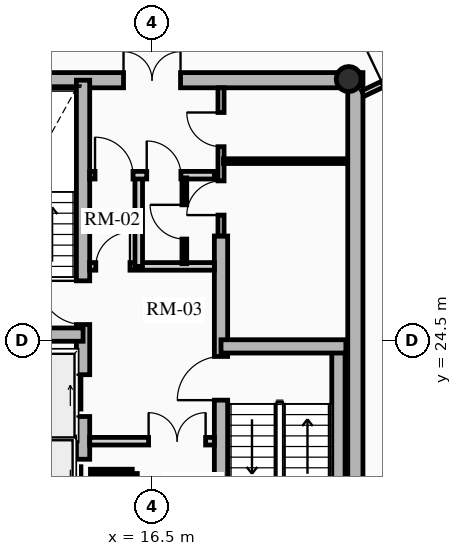
"""IFC4 building model, lengths in metres.
Left out: names, types, materials, properties, quantities, classifications, styles, units other than length and angle.
Written with IfcOpenShell. Run it as: python <this file> out.ifc"""

import sys

from ifc_helpers import new_model, si_unit, direction, frame, frame_2d, origin, origin_2d, place, context, subcontext, project, spatial, rectangle, hollow_circle, extrude, source, transform, mapped, element, fill, save


model = new_model("IFC4")
c1 = context("Model", 3, precision=1e-05, world=origin(), true_north=direction((0.0, 1.0)))
c2 = subcontext(c1, "Body", "Model", "MODEL_VIEW")
j1 = project(units=[si_unit("LENGTHUNIT", "METRE"), si_unit("PLANEANGLEUNIT", "RADIAN")], contexts=[c1])
p1 = place(None, origin())
s1 = spatial("IfcSite", under=j1, at=p1, CompositionType="ELEMENT")
p2 = place(p1, origin())
s2 = spatial("IfcBuilding", under=s1, at=p2, CompositionType="ELEMENT")
p3 = place(p2, frame((0.0, 0.0, 222.85)))
s3 = spatial("IfcBuildingStorey", under=s2, at=p3, CompositionType="ELEMENT", Elevation=222.85)
p4 = place(p3, frame((21.85, 17.45, 0.0), z_axis=(0.0, 0.0, 1.0), x_axis=(0.0, 1.0, 0.0)))
e1 = element("IfcWall", 1, at=p4, inside=s3, PredefinedType="SHEAR", context=c2, shape_type="SweptSolid", body=[
    extrude(rectangle(XDim=14.1, YDim=0.4, at=frame_2d((7.05, 0.0))), origin(), (0.0, 0.0, 1.0), 3.2),
])
p5 = place(p3, frame((11.15, 31.35, 0.0), z_axis=(0.0, 0.0, 1.0), x_axis=(1.0, 0.0, 0.0)))
e2 = element("IfcWall", 2, at=p5, inside=s3, PredefinedType="SHEAR", context=c2, shape_type="SweptSolid", body=[
    extrude(rectangle(XDim=10.7, YDim=0.4, at=frame_2d((5.35, 0.0))), origin(), (0.0, 0.0, 1.0), 3.2),
])
m1 = source(origin(), c2, "Body", "SweptSolid", [
    extrude(rectangle(XDim=1.5, YDim=2.02, at=frame_2d((0.75, 1.01))), frame((0.0, 0.21, 0.0), z_axis=(0.0, -1.0, 0.0), x_axis=(1.0, 0.0, 0.0)), (0.0, 0.0, 1.0), 0.42),
])
p6 = place(p5, frame((4.6, 0.0, 0.0)))
e3 = element("IfcOpeningElement", 3, at=p6, cuts=e2, PredefinedType="OPENING", context=c2, shape_type="MappedRepresentation", body=[
    mapped(m1, transform((0.0, 0.0, 0.0), x_axis=(1.0, 0.0, 0.0), y_axis=(0.0, 1.0, 0.0), z_axis=(0.0, 0.0, 1.0), scale=1.0)),
])
p7 = place(p3, frame((14.685, 17.65, 0.0), z_axis=(0.0, 0.0, 1.0), x_axis=(0.0, 1.0, 0.0)))
e4 = element("IfcWall", 4, at=p7, inside=s3, PredefinedType="SHEAR", context=c2, shape_type="SweptSolid", body=[
    extrude(rectangle(XDim=13.7, YDim=0.35, at=frame_2d((6.85, 0.0))), origin(), (0.0, 0.0, 1.0), 3.2),
])
m2 = source(origin(), c2, "Body", "SweptSolid", [
    extrude(rectangle(XDim=1.1, YDim=2.015, at=frame_2d((0.55, 1.007))), frame((0.0, 0.185, 0.0), z_axis=(0.0, -1.0, 0.0), x_axis=(1.0, 0.0, 0.0)), (0.0, 0.0, 1.0), 0.37),
])
p8 = place(p7, frame((4.85, 0.0, 0.0)))
e5 = element("IfcOpeningElement", 5, at=p8, cuts=e4, PredefinedType="OPENING", context=c2, shape_type="MappedRepresentation", body=[
    mapped(m2, transform((0.0, 0.0, 0.0), x_axis=(1.0, 0.0, 0.0), y_axis=(0.0, 1.0, 0.0), z_axis=(0.0, 0.0, 1.0), scale=1.0)),
])
p9 = place(p7, frame((0.625, 0.0, 0.0)))
e6 = element("IfcOpeningElement", 6, at=p9, cuts=e4, PredefinedType="OPENING", context=c2, shape_type="MappedRepresentation", body=[
    mapped(m2, transform((0.0, 0.0, 0.0), x_axis=(1.0, 0.0, 0.0), y_axis=(0.0, 1.0, 0.0), z_axis=(0.0, 0.0, 1.0), scale=1.0)),
])
p10 = place(p7, frame((2.625, 0.0, 0.0)))
e7 = element("IfcOpeningElement", 7, at=p10, cuts=e4, PredefinedType="OPENING", context=c2, shape_type="MappedRepresentation", body=[
    mapped(m2, transform((0.0, 0.0, 0.0), x_axis=(1.0, 0.0, 0.0), y_axis=(0.0, 1.0, 0.0), z_axis=(0.0, 0.0, 1.0), scale=1.0)),
])
m3 = source(origin(), c2, "Body", "SweptSolid", [
    extrude(rectangle(XDim=1.15, YDim=2.02, at=frame_2d((0.575, 1.01))), frame((0.0, 0.185, 0.0), z_axis=(0.0, -1.0, 0.0), x_axis=(1.0, 0.0, 0.0)), (0.0, 0.0, 1.0), 0.37),
])
p11 = place(p7, frame((7.27, 0.0, 0.0)))
e8 = element("IfcOpeningElement", 8, at=p11, cuts=e4, PredefinedType="OPENING", context=c2, shape_type="MappedRepresentation", body=[
    mapped(m3, transform((0.0, 0.0, 0.0), x_axis=(1.0, 0.0, 0.0), y_axis=(0.0, 1.0, 0.0), z_axis=(0.0, 0.0, 1.0), scale=1.0)),
])
p12 = place(p3, frame((18.315, 17.65, 0.0), z_axis=(0.0, 0.0, 1.0), x_axis=(0.0, 1.0, 0.0)))
e9 = element("IfcWall", 9, at=p12, inside=s3, PredefinedType="SHEAR", context=c2, shape_type="SweptSolid", body=[
    extrude(rectangle(XDim=9.6, YDim=0.35, at=frame_2d((4.8, 0.0))), origin(), (0.0, 0.0, 1.0), 3.2),
])
p13 = place(p12, frame((5.28, 0.0, 0.0)))
e10 = element("IfcOpeningElement", 10, at=p13, cuts=e9, PredefinedType="OPENING", context=c2, shape_type="MappedRepresentation", body=[
    mapped(m3, transform((0.0, 0.0, 0.0), x_axis=(1.0, 0.0, 0.0), y_axis=(0.0, 1.0, 0.0), z_axis=(0.0, 0.0, 1.0), scale=1.0)),
])
p14 = place(p3, frame((11.4, 24.655, 0.0), z_axis=(0.0, 0.0, 1.0), x_axis=(1.0, 0.0, 0.0)))
e11 = element("IfcWall", 11, at=p14, inside=s3, PredefinedType="SHEAR", context=c2, shape_type="SweptSolid", body=[
    extrude(rectangle(XDim=3.285, YDim=0.35, at=frame_2d((1.643, 0.0))), origin(), (0.0, 0.0, 1.0), 3.2),
])
p15 = place(p3, frame((21.405, 17.65, 0.0), z_axis=(0.0, 0.0, 1.0), x_axis=(0.0, 1.0, 0.0)))
e12 = element("IfcWall", 12, at=p15, inside=s3, PredefinedType="SHEAR", context=c2, shape_type="SweptSolid", body=[
    extrude(rectangle(XDim=6.695, YDim=0.35, at=frame_2d((3.348, 0.0))), origin(), (0.0, 0.0, 1.0), 3.2),
])
p16 = place(p3, frame((18.315, 24.345, 0.0), z_axis=(0.0, 0.0, 1.0), x_axis=(1.0, 0.0, 0.0)))
e13 = element("IfcWall", 13, at=p16, inside=s3, PredefinedType="SHEAR", context=c2, shape_type="SweptSolid", body=[
    extrude(rectangle(XDim=3.285, YDim=0.35, at=frame_2d((1.643, 0.0))), origin(), (0.0, 0.0, 1.0), 3.2),
])
p17 = place(p3, frame((21.675, 31.38, 0.0), z_axis=(0.0, 0.0, 1.0), x_axis=(1.0, 0.0, 0.0)))
e14 = element("IfcColumn", 14, at=p17, inside=s3, PredefinedType="COLUMN", context=c2, shape_type="SweptSolid", body=[
    extrude(hollow_circle(Radius=0.33, WallThickness=0.025, at=origin_2d()), origin(), (0.0, 0.0, 1.0), 3.2),
])
p18 = place(p3, frame((11.52, 21.8, 0.0), z_axis=(0.0, 0.0, 1.0), x_axis=(1.0, 0.0, 0.0)))
e15 = element("IfcWall", 15, at=p18, inside=s3, PredefinedType="SHEAR", context=c2, shape_type="SweptSolid", body=[
    extrude(rectangle(XDim=2.97, YDim=0.2, at=frame_2d((1.485, 0.0))), origin(), (0.0, 0.0, 1.0), 3.2),
])
p19 = place(p3, frame((14.86, 21.85, 0.0), z_axis=(0.0, 0.0, 1.0), x_axis=(1.0, 0.0, 0.0)))
e16 = element("IfcWall", 16, at=p19, inside=s3, PredefinedType="PARTITIONING", context=c2, shape_type="SweptSolid", body=[
    extrude(rectangle(XDim=3.28, YDim=0.2, at=frame_2d((1.64, 0.0))), origin(), (0.0, 0.0, 1.0), 2.975),
])
m4 = source(origin(), c2, "Body", "SweptSolid", [
    extrude(rectangle(XDim=1.5, YDim=2.02, at=frame_2d((0.75, 1.01))), frame((0.0, 0.11, 0.0), z_axis=(0.0, -1.0, 0.0), x_axis=(1.0, 0.0, 0.0)), (0.0, 0.0, 1.0), 0.22),
])
p20 = place(p19, frame((1.55, 0.0, 0.0)))
e17 = element("IfcOpeningElement", 17, at=p20, cuts=e16, PredefinedType="OPENING", context=c2, shape_type="MappedRepresentation", body=[
    mapped(m4, transform((0.0, 0.0, 0.0), x_axis=(1.0, 0.0, 0.0), y_axis=(0.0, 1.0, 0.0), z_axis=(0.0, 0.0, 1.0), scale=1.0)),
])
p21 = place(p3, frame((14.86, 26.45, 0.0), z_axis=(0.0, 0.0, 1.0), x_axis=(1.0, 0.0, 0.0)))
e18 = element("IfcWall", 18, at=p21, inside=s3, PredefinedType="PARTITIONING", context=c2, shape_type="SweptSolid", body=[
    extrude(rectangle(XDim=3.28, YDim=0.2, at=frame_2d((1.64, 0.0))), origin(), (0.0, 0.0, 1.0), 2.975),
])
m5 = source(origin(), c2, "Body", "SweptSolid", [
    extrude(rectangle(XDim=0.9, YDim=2.005, at=frame_2d((0.45, 1.002))), frame((0.0, 0.11, 0.0), z_axis=(0.0, -1.0, 0.0), x_axis=(1.0, 0.0, 0.0)), (0.0, 0.0, 1.0), 0.22),
])
p22 = place(p21, frame((0.16, 0.0, 0.0)))
e19 = element("IfcOpeningElement", 19, at=p22, cuts=e18, PredefinedType="OPENING", context=c2, shape_type="MappedRepresentation", body=[
    mapped(m5, transform((0.0, 0.0, 0.0), x_axis=(1.0, 0.0, 0.0), y_axis=(0.0, 1.0, 0.0), z_axis=(0.0, 0.0, 1.0), scale=1.0)),
])
p23 = place(p3, frame((16.15, 26.45, 0.0), z_axis=(0.0, 0.0, 1.0), x_axis=(0.0, 1.0, 0.0)))
e20 = element("IfcWall", 20, at=p23, inside=s3, PredefinedType="PARTITIONING", context=c2, shape_type="SweptSolid", body=[
    extrude(rectangle(XDim=2.4, YDim=0.2, at=frame_2d((1.2, 0.0))), origin(), (0.0, 0.0, 1.0), 2.975),
])
p24 = place(p3, frame((14.86, 28.85, 0.0), z_axis=(0.0, 0.0, 1.0), x_axis=(1.0, 0.0, 0.0)))
e21 = element("IfcWall", 21, at=p24, inside=s3, PredefinedType="PARTITIONING", context=c2, shape_type="SweptSolid", body=[
    extrude(rectangle(XDim=3.28, YDim=0.2, at=frame_2d((1.64, 0.0))), origin(), (0.0, 0.0, 1.0), 2.975),
])
m6 = source(origin(), c2, "Body", "SweptSolid", [
    extrude(rectangle(XDim=1.0, YDim=2.015, at=frame_2d((0.5, 1.007))), frame((0.0, 0.11, 0.0), z_axis=(0.0, -1.0, 0.0), x_axis=(1.0, 0.0, 0.0)), (0.0, 0.0, 1.0), 0.22),
])
p25 = place(p24, frame((0.14, 0.0, 0.0)))
e22 = element("IfcOpeningElement", 22, at=p25, cuts=e21, PredefinedType="OPENING", context=c2, shape_type="MappedRepresentation", body=[
    mapped(m6, transform((0.0, 0.0, 0.0), x_axis=(1.0, 0.0, 0.0), y_axis=(0.0, 1.0, 0.0), z_axis=(0.0, 0.0, 1.0), scale=1.0)),
])
p26 = place(p24, frame((1.5, 0.0, 0.0)))
e23 = element("IfcOpeningElement", 23, at=p26, cuts=e21, PredefinedType="OPENING", context=c2, shape_type="MappedRepresentation", body=[
    mapped(m5, transform((0.0, 0.0, 0.0), x_axis=(1.0, 0.0, 0.0), y_axis=(0.0, 1.0, 0.0), z_axis=(0.0, 0.0, 1.0), scale=1.0)),
])
p27 = place(p3, frame((16.05, 17.92, 0.0), z_axis=(0.0, 0.0, 1.0), x_axis=(0.0, 1.0, 0.0)))
e24 = element("IfcWall", 24, at=p27, inside=s3, PredefinedType="PARTITIONING", context=c2, shape_type="SweptSolid", body=[
    extrude(rectangle(XDim=3.08, YDim=0.125, at=frame_2d((1.54, 0.0))), origin(), (0.0, 0.0, 1.0), 2.975),
])
m7 = source(origin(), c2, "Body", "SweptSolid", [
    extrude(rectangle(XDim=0.9, YDim=2.005, at=frame_2d((0.45, 1.002))), frame((0.0, 0.073, 0.0), z_axis=(0.0, -1.0, 0.0), x_axis=(1.0, 0.0, 0.0)), (0.0, 0.0, 1.0), 0.145),
])
p28 = place(p27, frame((1.05, 0.0, 0.0)))
e25 = element("IfcOpeningElement", 25, at=p28, cuts=e24, PredefinedType="OPENING", context=c2, shape_type="MappedRepresentation", body=[
    mapped(m7, transform((0.0, 0.0, 0.0), x_axis=(1.0, 0.0, 0.0), y_axis=(0.0, 1.0, 0.0), z_axis=(0.0, 0.0, 1.0), scale=1.0)),
])
p29 = place(p3, frame((14.88, 21.05, 0.0), z_axis=(0.0, 0.0, 1.0), x_axis=(1.0, 0.0, 0.0)))
e26 = element("IfcWall", 26, at=p29, inside=s3, PredefinedType="PARTITIONING", context=c2, shape_type="SweptSolid", body=[
    extrude(rectangle(XDim=1.1, YDim=0.125, at=frame_2d((0.55, 0.0))), origin(), (0.0, 0.0, 1.0), 2.975),
])
p30 = place(p3, frame((17.35, 26.52, 0.0), z_axis=(0.0, 0.0, 1.0), x_axis=(0.0, 1.0, 0.0)))
e27 = element("IfcWall", 27, at=p30, inside=s3, PredefinedType="PARTITIONING", context=c2, shape_type="SweptSolid", body=[
    extrude(rectangle(XDim=2.26, YDim=0.125, at=frame_2d((1.13, 0.0))), origin(), (0.0, 0.0, 1.0), 2.975),
])
p31 = place(p30, frame((0.65, 0.0, 0.0)))
e28 = element("IfcOpeningElement", 28, at=p31, cuts=e27, PredefinedType="OPENING", context=c2, shape_type="MappedRepresentation", body=[
    mapped(m7, transform((0.0, 0.0, 0.0), x_axis=(1.0, 0.0, 0.0), y_axis=(0.0, 1.0, 0.0), z_axis=(0.0, 0.0, 1.0), scale=1.0)),
])
p32 = place(p3, frame((18.315, 27.25, 0.0), z_axis=(0.0, 0.0, 1.0), x_axis=(0.0, 1.0, 0.0)))
e29 = element("IfcWall", 29, at=p32, inside=s3, PredefinedType="PARTITIONING", context=c2, shape_type="SweptSolid", body=[
    extrude(rectangle(XDim=3.9, YDim=0.16, at=frame_2d((1.95, 0.0))), origin(), (0.0, 0.0, 1.0), 2.975),
])
m8 = source(origin(), c2, "Body", "SweptSolid", [
    extrude(rectangle(XDim=0.9, YDim=2.005, at=frame_2d((0.45, 1.002))), frame((0.0, 0.09, 0.0), z_axis=(0.0, -1.0, 0.0), x_axis=(1.0, 0.0, 0.0)), (0.0, 0.0, 1.0), 0.18),
])
p33 = place(p32, frame((0.55, 0.0, 0.0)))
e30 = element("IfcOpeningElement", 30, at=p33, cuts=e29, PredefinedType="OPENING", context=c2, shape_type="MappedRepresentation", body=[
    mapped(m8, transform((0.0, 0.0, 0.0), x_axis=(1.0, 0.0, 0.0), y_axis=(0.0, 1.0, 0.0), z_axis=(0.0, 0.0, 1.0), scale=1.0)),
])
p34 = place(p32, frame((2.35, 0.0, 0.0)))
e31 = element("IfcOpeningElement", 31, at=p34, cuts=e29, PredefinedType="OPENING", context=c2, shape_type="MappedRepresentation", body=[
    mapped(m8, transform((0.0, 0.0, 0.0), x_axis=(1.0, 0.0, 0.0), y_axis=(0.0, 1.0, 0.0), z_axis=(0.0, 0.0, 1.0), scale=1.0)),
])
p35 = place(p3, frame((18.38, 29.22, 0.0), z_axis=(0.0, 0.0, 1.0), x_axis=(1.0, 0.0, 0.0)))
e32 = element("IfcWall", 32, at=p35, inside=s3, PredefinedType="PARTITIONING", context=c2, shape_type="SweptSolid", body=[
    extrude(rectangle(XDim=3.22, YDim=0.125, at=frame_2d((1.61, 0.0))), origin(), (0.0, 0.0, 1.0), 2.512),
])
p36 = place(p3, frame((22.05, 31.0, 0.0), z_axis=(0.0, 0.0, 1.0), x_axis=(0.903013459407, 0.429612257891, 0.0)))
e33 = element("IfcWall", 33, at=p36, inside=s3, PredefinedType="PARTITIONING", context=c2, shape_type="SweptSolid", body=[
    extrude(rectangle(XDim=1.829, YDim=0.16, at=frame_2d((0.914, 0.0))), origin(), (0.0, 0.0, 1.0), 2.545),
])
m9 = source(origin(), c2, "Body", "SweptSolid", [
    extrude(rectangle(XDim=1.05, YDim=2.015, at=frame_2d((0.525, 1.007))), frame((0.0, 0.09, 0.0), z_axis=(0.0, -1.0, 0.0), x_axis=(1.0, 0.0, 0.0)), (0.0, 0.0, 1.0), 0.18),
])
p37 = place(p36, frame((0.579, 0.0, 0.0)))
e34 = element("IfcOpeningElement", 34, at=p37, cuts=e33, PredefinedType="OPENING", context=c2, shape_type="MappedRepresentation", body=[
    mapped(m9, transform((0.0, 0.0, 0.0), x_axis=(1.0, 0.0, 0.0), y_axis=(0.0, 1.0, 0.0), z_axis=(0.0, 0.0, 1.0), scale=1.0)),
])
m10 = source(origin(), c2, "Body", "SweptSolid", [
    extrude(rectangle(XDim=1.1, YDim=2.015, at=frame_2d((0.55, 1.007))), frame((0.0, 0.025, 0.0), z_axis=(0.0, -1.0, 0.0), x_axis=(1.0, 0.0, 0.0)), (0.0, 0.0, 1.0), 0.05),
])
p38 = place(p8, origin())
e35 = element("IfcDoor", 35, at=p38, inside=s3, OperationType="SLIDING_TO_RIGHT", PredefinedType="DOOR", context=c2, shape_type="MappedRepresentation", body=[
    mapped(m10, transform((0.0, 0.0, 0.0), x_axis=(1.0, 0.0, 0.0), y_axis=(0.0, 1.0, 0.0), z_axis=(0.0, 0.0, 1.0), scale=1.0)),
])
fill(e5, e35)
p39 = place(p10, origin())
e36 = element("IfcDoor", 36, at=p39, inside=s3, OperationType="SLIDING_TO_LEFT", PredefinedType="DOOR", context=c2, shape_type="MappedRepresentation", body=[
    mapped(m10, transform((0.0, 0.0, 0.0), x_axis=(1.0, 0.0, 0.0), y_axis=(0.0, 1.0, 0.0), z_axis=(0.0, 0.0, 1.0), scale=1.0)),
])
fill(e7, e36)
m11 = source(origin(), c2, "Body", "SweptSolid", [
    extrude(rectangle(XDim=1.15, YDim=2.02, at=frame_2d((0.575, 1.01))), frame((0.0, 0.025, 0.0), z_axis=(0.0, -1.0, 0.0), x_axis=(1.0, 0.0, 0.0)), (0.0, 0.0, 1.0), 0.05),
])
p40 = place(p11, origin())
e37 = element("IfcDoor", 37, at=p40, inside=s3, OperationType="SINGLE_SWING_RIGHT", PredefinedType="DOOR", context=c2, shape_type="MappedRepresentation", body=[
    mapped(m11, transform((0.0, 0.0, 0.0), x_axis=(1.0, 0.0, 0.0), y_axis=(0.0, 1.0, 0.0), z_axis=(0.0, 0.0, 1.0), scale=1.0)),
])
fill(e8, e37)
p41 = place(p13, origin())
e38 = element("IfcDoor", 38, at=p41, inside=s3, OperationType="SINGLE_SWING_LEFT", PredefinedType="DOOR", context=c2, shape_type="MappedRepresentation", body=[
    mapped(m11, transform((0.0, 0.0, 0.0), x_axis=(1.0, 0.0, 0.0), y_axis=(0.0, 1.0, 0.0), z_axis=(0.0, 0.0, 1.0), scale=1.0)),
])
fill(e10, e38)
m12 = source(origin(), c2, "Body", "SweptSolid", [
    extrude(rectangle(XDim=1.5, YDim=2.02, at=frame_2d((0.75, 1.01))), frame((0.0, 0.025, 0.0), z_axis=(0.0, -1.0, 0.0), x_axis=(1.0, 0.0, 0.0)), (0.0, 0.0, 1.0), 0.05),
])
p42 = place(p6, origin())
e39 = element("IfcDoor", 39, at=p42, inside=s3, OperationType="DOUBLE_DOOR_SINGLE_SWING", PredefinedType="DOOR", context=c2, shape_type="MappedRepresentation", body=[
    mapped(m12, transform((0.0, 0.0, 0.0), x_axis=(1.0, 0.0, 0.0), y_axis=(0.0, 1.0, 0.0), z_axis=(0.0, 0.0, 1.0), scale=1.0)),
])
fill(e3, e39)
p43 = place(p20, origin())
e40 = element("IfcDoor", 40, at=p43, inside=s3, OperationType="DOUBLE_DOOR_SINGLE_SWING", PredefinedType="DOOR", context=c2, shape_type="MappedRepresentation", body=[
    mapped(m12, transform((0.0, 0.0, 0.0), x_axis=(1.0, 0.0, 0.0), y_axis=(0.0, 1.0, 0.0), z_axis=(0.0, 0.0, 1.0), scale=1.0)),
])
fill(e17, e40)
m13 = source(origin(), c2, "Body", "SweptSolid", [
    extrude(rectangle(XDim=0.9, YDim=2.005, at=frame_2d((0.45, 1.002))), frame((0.0, 0.025, 0.0), z_axis=(0.0, -1.0, 0.0), x_axis=(1.0, 0.0, 0.0)), (0.0, 0.0, 1.0), 0.05),
])
p44 = place(p22, origin())
e41 = element("IfcDoor", 41, at=p44, inside=s3, OperationType="SINGLE_SWING_RIGHT", PredefinedType="DOOR", context=c2, shape_type="MappedRepresentation", body=[
    mapped(m13, transform((0.0, 0.0, 0.0), x_axis=(1.0, 0.0, 0.0), y_axis=(0.0, 1.0, 0.0), z_axis=(0.0, 0.0, 1.0), scale=1.0)),
])
fill(e19, e41)
m14 = source(origin(), c2, "Body", "SweptSolid", [
    extrude(rectangle(XDim=1.0, YDim=2.015, at=frame_2d((0.5, 1.007))), frame((0.0, 0.025, 0.0), z_axis=(0.0, -1.0, 0.0), x_axis=(1.0, 0.0, 0.0)), (0.0, 0.0, 1.0), 0.05),
])
p45 = place(p25, origin())
e42 = element("IfcDoor", 42, at=p45, inside=s3, OperationType="SINGLE_SWING_LEFT", PredefinedType="DOOR", context=c2, shape_type="MappedRepresentation", body=[
    mapped(m14, transform((0.0, 0.0, 0.0), x_axis=(1.0, 0.0, 0.0), y_axis=(0.0, 1.0, 0.0), z_axis=(0.0, 0.0, 1.0), scale=1.0)),
])
fill(e22, e42)
p46 = place(p26, origin())
e43 = element("IfcDoor", 43, at=p46, inside=s3, OperationType="SINGLE_SWING_LEFT", PredefinedType="DOOR", context=c2, shape_type="MappedRepresentation", body=[
    mapped(m13, transform((0.0, 0.0, 0.0), x_axis=(1.0, 0.0, 0.0), y_axis=(0.0, 1.0, 0.0), z_axis=(0.0, 0.0, 1.0), scale=1.0)),
])
fill(e23, e43)
p47 = place(p31, origin())
e44 = element("IfcDoor", 44, at=p47, inside=s3, OperationType="SINGLE_SWING_RIGHT", PredefinedType="DOOR", context=c2, shape_type="MappedRepresentation", body=[
    mapped(m13, transform((0.0, 0.0, 0.0), x_axis=(1.0, 0.0, 0.0), y_axis=(0.0, 1.0, 0.0), z_axis=(0.0, 0.0, 1.0), scale=1.0)),
])
fill(e28, e44)
p48 = place(p33, origin())
e45 = element("IfcDoor", 45, at=p48, inside=s3, OperationType="SINGLE_SWING_LEFT", PredefinedType="DOOR", context=c2, shape_type="MappedRepresentation", body=[
    mapped(m13, transform((0.0, 0.0, 0.0), x_axis=(1.0, 0.0, 0.0), y_axis=(0.0, 1.0, 0.0), z_axis=(0.0, 0.0, 1.0), scale=1.0)),
])
fill(e30, e45)
p49 = place(p34, origin())
e46 = element("IfcDoor", 46, at=p49, inside=s3, OperationType="SINGLE_SWING_RIGHT", PredefinedType="DOOR", context=c2, shape_type="MappedRepresentation", body=[
    mapped(m13, transform((0.0, 0.0, 0.0), x_axis=(1.0, 0.0, 0.0), y_axis=(0.0, 1.0, 0.0), z_axis=(0.0, 0.0, 1.0), scale=1.0)),
])
fill(e31, e46)
save(model, sys.argv[1])
